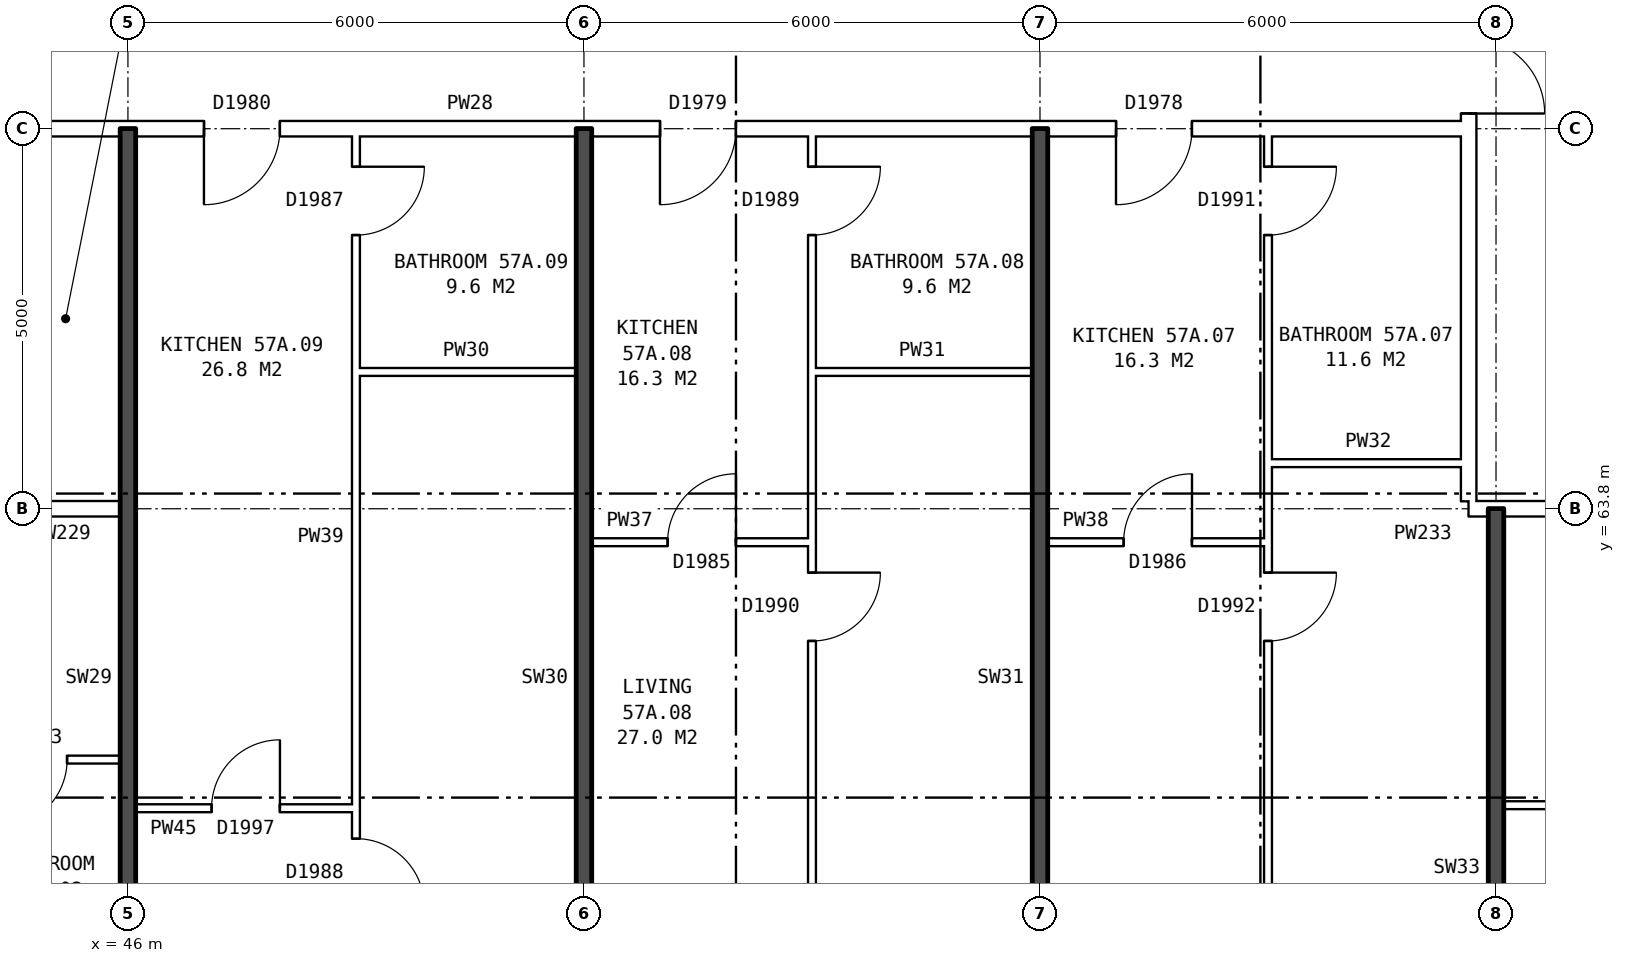
"""IFC4 building model, lengths in metres.
Left out: names, types, materials, properties, quantities, classifications, styles, units other than length and angle.
Written with IfcOpenShell. Run it as: python <this file> out.ifc"""

import sys

from ifc_helpers import new_model, si_unit, direction, frame, frame_2d, origin, place, context, subcontext, project, spatial, rectangle, extrude, element, fill, save


model = new_model("IFC4")
c1 = context("Model", 3, precision=1e-05, world=origin(), true_north=direction((0.0, 1.0)))
c2 = subcontext(c1, "Body", "Model", "MODEL_VIEW")
j1 = project(units=[si_unit("LENGTHUNIT", "METRE"), si_unit("PLANEANGLEUNIT", "RADIAN")], contexts=[c1])
p1 = place(None, origin())
s1 = spatial("IfcSite", under=j1, at=p1, CompositionType="ELEMENT")
p2 = place(p1, origin())
s2 = spatial("IfcBuilding", under=s1, at=p2, CompositionType="ELEMENT")
p3 = place(p2, frame((0.0, 0.0, 202.8)))
s3 = spatial("IfcBuildingStorey", under=s2, at=p3, CompositionType="ELEMENT", Elevation=202.8)
p4 = place(p3, frame((63.64, 63.9, 0.0), z_axis=(0.0, 0.0, 1.0), x_axis=(0.0, 1.0, 0.0)))
e1 = element("IfcWall", 1, at=p4, inside=s3, PredefinedType="PARTITIONING", context=c2, shape_type="SweptSolid", body=[
    extrude(rectangle(XDim=12.2, YDim=0.2, at=frame_2d((6.1, 0.0))), origin(), (0.0, 0.0, 1.0), 2.85),
])
p5 = place(p4, frame((5.1, 0.0, 0.0)))
e2 = element("IfcOpeningElement", 2, at=p5, cuts=e1, PredefinedType="OPENING", context=c2, shape_type="SweptSolid", body=[
    extrude(rectangle(XDim=2.0, YDim=2.1, at=frame_2d((1.0, 1.05))), frame((0.0, 0.11, 0.0), z_axis=(0.0, -1.0, 0.0), x_axis=(1.0, 0.0, 0.0)), (0.0, 0.0, 1.0), 0.22),
])
p6 = place(p3, frame((46.1, 59.86, 0.0), z_axis=(0.0, 0.0, 1.0), x_axis=(1.0, 0.0, 0.0)))
e3 = element("IfcWall", 3, at=p6, inside=s3, PredefinedType="PARTITIONING", context=c2, shape_type="SweptSolid", body=[
    extrude(rectangle(XDim=2.9, YDim=0.1, at=frame_2d((1.45, 0.0))), origin(), (0.0, 0.0, 1.0), 2.85),
])
p7 = place(p6, frame((1.0, 0.0, 0.0)))
e4 = element("IfcOpeningElement", 4, at=p7, cuts=e3, PredefinedType="OPENING", context=c2, shape_type="SweptSolid", body=[
    extrude(rectangle(XDim=0.9, YDim=2.1, at=frame_2d((0.45, 1.05))), frame((0.0, 0.06, 0.0), z_axis=(0.0, -1.0, 0.0), x_axis=(1.0, 0.0, 0.0)), (0.0, 0.0, 1.0), 0.12),
])
p8 = place(p3, frame((64.1, 59.9, 0.0), z_axis=(0.0, 0.0, 1.0), x_axis=(1.0, 0.0, 0.0)))
e5 = element("IfcWall", 5, at=p8, inside=s3, PredefinedType="PARTITIONING", context=c2, shape_type="SweptSolid", body=[
    extrude(rectangle(XDim=5.8, YDim=0.1, at=frame_2d((2.9, 0.0))), origin(), (0.0, 0.0, 1.0), 2.85),
])
p9 = place(p8, frame((3.6, 0.0, 0.0)))
e6 = element("IfcOpeningElement", 6, at=p9, cuts=e5, PredefinedType="OPENING", context=c2, shape_type="SweptSolid", body=[
    extrude(rectangle(XDim=0.9, YDim=2.1, at=frame_2d((0.45, 1.05))), frame((0.0, 0.06, 0.0), z_axis=(0.0, -1.0, 0.0), x_axis=(1.0, 0.0, 0.0)), (0.0, 0.0, 1.0), 0.12),
])
p10 = place(p8, frame((0.7, 0.0, 0.0)))
e7 = element("IfcOpeningElement", 7, at=p10, cuts=e5, PredefinedType="OPENING", context=c2, shape_type="SweptSolid", body=[
    extrude(rectangle(XDim=0.9, YDim=2.1, at=frame_2d((0.45, 1.05))), frame((0.0, 0.06, 0.0), z_axis=(0.0, -1.0, 0.0), x_axis=(1.0, 0.0, 0.0)), (0.0, 0.0, 1.0), 0.12),
])
p11 = place(p3, frame((40.1, 60.5, 0.0), z_axis=(0.0, 0.0, 1.0), x_axis=(1.0, 0.0, 0.0)))
e8 = element("IfcWall", 8, at=p11, inside=s3, PredefinedType="PARTITIONING", context=c2, shape_type="SweptSolid", body=[
    extrude(rectangle(XDim=5.8, YDim=0.1, at=frame_2d((2.9, 0.0))), origin(), (0.0, 0.0, 1.0), 2.85),
])
p12 = place(p11, frame((1.3, 0.0, 0.0)))
e9 = element("IfcOpeningElement", 9, at=p12, cuts=e8, PredefinedType="OPENING", context=c2, shape_type="SweptSolid", body=[
    extrude(rectangle(XDim=0.9, YDim=2.1, at=frame_2d((0.45, 1.05))), frame((0.0, 0.06, 0.0), z_axis=(0.0, -1.0, 0.0), x_axis=(1.0, 0.0, 0.0)), (0.0, 0.0, 1.0), 0.12),
])
p13 = place(p11, frame((4.2, 0.0, 0.0)))
e10 = element("IfcOpeningElement", 10, at=p13, cuts=e8, PredefinedType="OPENING", context=c2, shape_type="SweptSolid", body=[
    extrude(rectangle(XDim=0.9, YDim=2.1, at=frame_2d((0.45, 1.05))), frame((0.0, 0.06, 0.0), z_axis=(0.0, -1.0, 0.0), x_axis=(1.0, 0.0, 0.0)), (0.0, 0.0, 1.0), 0.12),
])
p14 = place(p3, frame((52.1, 63.36, 0.0), z_axis=(0.0, 0.0, 1.0), x_axis=(1.0, 0.0, 0.0)))
e11 = element("IfcWall", 11, at=p14, inside=s3, PredefinedType="PARTITIONING", context=c2, shape_type="SweptSolid", body=[
    extrude(rectangle(XDim=2.9, YDim=0.1, at=frame_2d((1.45, 0.0))), origin(), (0.0, 0.0, 1.0), 2.85),
])
p15 = place(p14, frame((1.0, 0.0, 0.0)))
e12 = element("IfcOpeningElement", 12, at=p15, cuts=e11, PredefinedType="OPENING", context=c2, shape_type="SweptSolid", body=[
    extrude(rectangle(XDim=0.9, YDim=2.1, at=frame_2d((0.45, 1.05))), frame((0.0, 0.06, 0.0), z_axis=(0.0, -1.0, 0.0), x_axis=(1.0, 0.0, 0.0)), (0.0, 0.0, 1.0), 0.12),
])
p16 = place(p3, frame((58.1, 63.36, 0.0), z_axis=(0.0, 0.0, 1.0), x_axis=(1.0, 0.0, 0.0)))
e13 = element("IfcWall", 13, at=p16, inside=s3, PredefinedType="PARTITIONING", context=c2, shape_type="SweptSolid", body=[
    extrude(rectangle(XDim=2.9, YDim=0.1, at=frame_2d((1.45, 0.0))), origin(), (0.0, 0.0, 1.0), 2.85),
])
p17 = place(p16, frame((1.0, 0.0, 0.0)))
e14 = element("IfcOpeningElement", 14, at=p17, cuts=e13, PredefinedType="OPENING", context=c2, shape_type="SweptSolid", body=[
    extrude(rectangle(XDim=0.9, YDim=2.1, at=frame_2d((0.45, 1.05))), frame((0.0, 0.06, 0.0), z_axis=(0.0, -1.0, 0.0), x_axis=(1.0, 0.0, 0.0)), (0.0, 0.0, 1.0), 0.12),
])
p18 = place(p3, frame((44.36, 63.8, 0.0), z_axis=(0.0, 0.0, 1.0), x_axis=(1.0, 0.0, 0.0)))
e15 = element("IfcWall", 15, at=p18, inside=s3, PredefinedType="PARTITIONING", context=c2, shape_type="SweptSolid", body=[
    extrude(rectangle(XDim=1.54, YDim=0.2, at=frame_2d((0.77, 0.0))), origin(), (0.0, 0.0, 1.0), 2.85),
])
p19 = place(p3, frame((63.64, 63.8, 0.0), z_axis=(0.0, 0.0, 1.0), x_axis=(1.0, 0.0, 0.0)))
e16 = element("IfcWall", 16, at=p19, inside=s3, PredefinedType="PARTITIONING", context=c2, shape_type="SweptSolid", body=[
    extrude(rectangle(XDim=3.0, YDim=0.2, at=frame_2d((1.5, 0.0))), origin(), (0.0, 0.0, 1.0), 2.85),
])
p20 = place(p19, frame((1.18, 0.0, 0.0)))
e17 = element("IfcOpeningElement", 17, at=p20, cuts=e16, PredefinedType="OPENING", context=c2, shape_type="SweptSolid", body=[
    extrude(rectangle(XDim=1.0, YDim=2.1, at=frame_2d((0.5, 1.05))), frame((0.0, 0.11, 0.0), z_axis=(0.0, -1.0, 0.0), x_axis=(1.0, 0.0, 0.0)), (0.0, 0.0, 1.0), 0.22),
])
p21 = place(p3, frame((61.0, 64.4, 0.0), z_axis=(0.0, 0.0, 1.0), x_axis=(1.0, 0.0, 0.0)))
e18 = element("IfcWall", 18, at=p21, inside=s3, PredefinedType="PARTITIONING", context=c2, shape_type="SweptSolid", body=[
    extrude(rectangle(XDim=2.64, YDim=0.1, at=frame_2d((1.32, 0.0))), origin(), (0.0, 0.0, 1.0), 2.85),
])
for number, where, z_axis, x_axis in (
    (19, (49.0, 65.6, 0.0), (0.0, 0.0, 1.0), (1.0, 0.0, 0.0)),
    (20, (55.0, 65.6, 0.0), (0.0, 0.0, 1.0), (1.0, 0.0, 0.0)),
):
    element("IfcWall", number, at=place(p3, frame(where, z_axis=z_axis, x_axis=x_axis)), inside=s3, PredefinedType="PARTITIONING", context=c2, shape_type="SweptSolid", body=[
        extrude(rectangle(XDim=2.9, YDim=0.1, at=frame_2d((1.45, 0.0))), origin(), (0.0, 0.0, 1.0), 2.85),
    ])
p22 = place(p3, frame((44.36, 68.8, 0.0), z_axis=(0.0, 0.0, 1.0), x_axis=(1.0, 0.0, 0.0)))
e21 = element("IfcWall", 21, at=p22, inside=s3, PredefinedType="PARTITIONING", context=c2, shape_type="SweptSolid", body=[
    extrude(rectangle(XDim=19.28, YDim=0.2, at=frame_2d((9.64, 0.0))), origin(), (0.0, 0.0, 1.0), 2.85),
])
p23 = place(p22, frame((14.64, 0.0, 0.0)))
e22 = element("IfcOpeningElement", 22, at=p23, cuts=e21, PredefinedType="OPENING", context=c2, shape_type="SweptSolid", body=[
    extrude(rectangle(XDim=1.0, YDim=2.1, at=frame_2d((0.5, 1.05))), frame((0.0, 0.11, 0.0), z_axis=(0.0, -1.0, 0.0), x_axis=(1.0, 0.0, 0.0)), (0.0, 0.0, 1.0), 0.22),
])
p24 = place(p22, frame((8.64, 0.0, 0.0)))
e23 = element("IfcOpeningElement", 23, at=p24, cuts=e21, PredefinedType="OPENING", context=c2, shape_type="SweptSolid", body=[
    extrude(rectangle(XDim=1.0, YDim=2.1, at=frame_2d((0.5, 1.05))), frame((0.0, 0.11, 0.0), z_axis=(0.0, -1.0, 0.0), x_axis=(1.0, 0.0, 0.0)), (0.0, 0.0, 1.0), 0.22),
])
p25 = place(p22, frame((2.64, 0.0, 0.0)))
e24 = element("IfcOpeningElement", 24, at=p25, cuts=e21, PredefinedType="OPENING", context=c2, shape_type="SweptSolid", body=[
    extrude(rectangle(XDim=1.0, YDim=2.1, at=frame_2d((0.5, 1.05))), frame((0.0, 0.11, 0.0), z_axis=(0.0, -1.0, 0.0), x_axis=(1.0, 0.0, 0.0)), (0.0, 0.0, 1.0), 0.22),
])
p26 = place(p3, frame((46.0, 54.36, 0.0), z_axis=(0.0, 0.0, 1.0), x_axis=(0.0, 1.0, 0.0)))
e25 = element("IfcWall", 25, at=p26, inside=s3, PredefinedType="SOLIDWALL", context=c2, shape_type="SweptSolid", body=[
    extrude(rectangle(XDim=14.44, YDim=0.2, at=frame_2d((7.22, 0.0))), origin(), (0.0, 0.0, 1.0), 2.85),
])
p27 = place(p3, frame((49.0, 54.36, 0.0), z_axis=(0.0, 0.0, 1.0), x_axis=(0.0, 1.0, 0.0)))
e26 = element("IfcWall", 26, at=p27, inside=s3, PredefinedType="PARTITIONING", context=c2, shape_type="SweptSolid", body=[
    extrude(rectangle(XDim=14.34, YDim=0.1, at=frame_2d((7.17, 0.0))), origin(), (0.0, 0.0, 1.0), 2.85),
])
p28 = place(p27, frame((4.2, 0.0, 0.0)))
e27 = element("IfcOpeningElement", 27, at=p28, cuts=e26, PredefinedType="OPENING", context=c2, shape_type="SweptSolid", body=[
    extrude(rectangle(XDim=0.9, YDim=2.1, at=frame_2d((0.45, 1.05))), frame((0.0, 0.06, 0.0), z_axis=(0.0, -1.0, 0.0), x_axis=(1.0, 0.0, 0.0)), (0.0, 0.0, 1.0), 0.12),
])
p29 = place(p27, frame((13.04, 0.0, 0.0)))
e28 = element("IfcOpeningElement", 28, at=p29, cuts=e26, PredefinedType="OPENING", context=c2, shape_type="SweptSolid", body=[
    extrude(rectangle(XDim=0.9, YDim=2.1, at=frame_2d((0.45, 1.05))), frame((0.0, 0.06, 0.0), z_axis=(0.0, -1.0, 0.0), x_axis=(1.0, 0.0, 0.0)), (0.0, 0.0, 1.0), 0.12),
])
p30 = place(p3, frame((52.0, 54.36, 0.0), z_axis=(0.0, 0.0, 1.0), x_axis=(0.0, 1.0, 0.0)))
e29 = element("IfcWall", 29, at=p30, inside=s3, PredefinedType="SOLIDWALL", context=c2, shape_type="SweptSolid", body=[
    extrude(rectangle(XDim=14.44, YDim=0.2, at=frame_2d((7.22, 0.0))), origin(), (0.0, 0.0, 1.0), 2.85),
])
p31 = place(p3, frame((55.0, 54.36, 0.0), z_axis=(0.0, 0.0, 1.0), x_axis=(0.0, 1.0, 0.0)))
e30 = element("IfcWall", 30, at=p31, inside=s3, PredefinedType="PARTITIONING", context=c2, shape_type="SweptSolid", body=[
    extrude(rectangle(XDim=14.34, YDim=0.1, at=frame_2d((7.17, 0.0))), origin(), (0.0, 0.0, 1.0), 2.85),
])
p32 = place(p31, frame((7.7, 0.0, 0.0)))
e31 = element("IfcOpeningElement", 31, at=p32, cuts=e30, PredefinedType="OPENING", context=c2, shape_type="SweptSolid", body=[
    extrude(rectangle(XDim=0.9, YDim=2.1, at=frame_2d((0.45, 1.05))), frame((0.0, 0.06, 0.0), z_axis=(0.0, -1.0, 0.0), x_axis=(1.0, 0.0, 0.0)), (0.0, 0.0, 1.0), 0.12),
])
p33 = place(p31, frame((13.04, 0.0, 0.0)))
e32 = element("IfcOpeningElement", 32, at=p33, cuts=e30, PredefinedType="OPENING", context=c2, shape_type="SweptSolid", body=[
    extrude(rectangle(XDim=0.9, YDim=2.1, at=frame_2d((0.45, 1.05))), frame((0.0, 0.06, 0.0), z_axis=(0.0, -1.0, 0.0), x_axis=(1.0, 0.0, 0.0)), (0.0, 0.0, 1.0), 0.12),
])
p34 = place(p3, frame((58.0, 54.36, 0.0), z_axis=(0.0, 0.0, 1.0), x_axis=(0.0, 1.0, 0.0)))
e33 = element("IfcWall", 33, at=p34, inside=s3, PredefinedType="SOLIDWALL", context=c2, shape_type="SweptSolid", body=[
    extrude(rectangle(XDim=14.44, YDim=0.2, at=frame_2d((7.22, 0.0))), origin(), (0.0, 0.0, 1.0), 2.85),
])
p35 = place(p3, frame((61.0, 54.36, 0.0), z_axis=(0.0, 0.0, 1.0), x_axis=(0.0, 1.0, 0.0)))
e34 = element("IfcWall", 34, at=p35, inside=s3, PredefinedType="PARTITIONING", context=c2, shape_type="SweptSolid", body=[
    extrude(rectangle(XDim=14.34, YDim=0.1, at=frame_2d((7.17, 0.0))), origin(), (0.0, 0.0, 1.0), 2.85),
])
p36 = place(p35, frame((7.7, 0.0, 0.0)))
e35 = element("IfcOpeningElement", 35, at=p36, cuts=e34, PredefinedType="OPENING", context=c2, shape_type="SweptSolid", body=[
    extrude(rectangle(XDim=0.9, YDim=2.1, at=frame_2d((0.45, 1.05))), frame((0.0, 0.06, 0.0), z_axis=(0.0, -1.0, 0.0), x_axis=(1.0, 0.0, 0.0)), (0.0, 0.0, 1.0), 0.12),
])
p37 = place(p35, frame((13.04, 0.0, 0.0)))
e36 = element("IfcOpeningElement", 36, at=p37, cuts=e34, PredefinedType="OPENING", context=c2, shape_type="SweptSolid", body=[
    extrude(rectangle(XDim=0.9, YDim=2.1, at=frame_2d((0.45, 1.05))), frame((0.0, 0.06, 0.0), z_axis=(0.0, -1.0, 0.0), x_axis=(1.0, 0.0, 0.0)), (0.0, 0.0, 1.0), 0.12),
])
p38 = place(p3, frame((64.0, 54.36, 0.0), z_axis=(0.0, 0.0, 1.0), x_axis=(0.0, 1.0, 0.0)))
e37 = element("IfcWall", 37, at=p38, inside=s3, PredefinedType="SOLIDWALL", context=c2, shape_type="SweptSolid", body=[
    extrude(rectangle(XDim=9.44, YDim=0.2, at=frame_2d((4.72, 0.0))), origin(), (0.0, 0.0, 1.0), 2.85),
])
p39 = place(p5, frame((2.0, 0.0, 0.0), z_axis=(0.0, 0.0, 1.0), x_axis=(-1.0, 0.0, 0.0)))
e38 = element("IfcDoor", 38, at=p39, inside=s3, OperationType="DOUBLE_DOOR_SINGLE_SWING", PredefinedType="DOOR", context=c2, shape_type="SweptSolid", body=[
    extrude(rectangle(XDim=2.0, YDim=2.1, at=frame_2d((1.0, 1.05))), frame((0.0, 0.025, 0.0), z_axis=(0.0, -1.0, 0.0), x_axis=(1.0, 0.0, 0.0)), (0.0, 0.0, 1.0), 0.05),
])
fill(e2, e38)
p40 = place(p13, frame((0.9, 0.0, 0.0), z_axis=(0.0, 0.0, 1.0), x_axis=(-1.0, 0.0, 0.0)))
e39 = element("IfcDoor", 39, at=p40, inside=s3, OperationType="SINGLE_SWING_RIGHT", PredefinedType="DOOR", context=c2, shape_type="SweptSolid", body=[
    extrude(rectangle(XDim=0.9, YDim=2.1, at=frame_2d((0.45, 1.05))), frame((0.0, 0.025, 0.0), z_axis=(0.0, -1.0, 0.0), x_axis=(1.0, 0.0, 0.0)), (0.0, 0.0, 1.0), 0.05),
])
fill(e10, e39)
p41 = place(p36, frame((0.9, 0.0, 0.0), z_axis=(0.0, 0.0, 1.0), x_axis=(-1.0, 0.0, 0.0)))
e40 = element("IfcDoor", 40, at=p41, inside=s3, OperationType="SINGLE_SWING_LEFT", PredefinedType="DOOR", context=c2, shape_type="SweptSolid", body=[
    extrude(rectangle(XDim=0.9, YDim=2.1, at=frame_2d((0.45, 1.05))), frame((0.0, 0.025, 0.0), z_axis=(0.0, -1.0, 0.0), x_axis=(1.0, 0.0, 0.0)), (0.0, 0.0, 1.0), 0.05),
])
fill(e35, e40)
p42 = place(p23, frame((1.0, 0.0, 0.0), z_axis=(0.0, 0.0, 1.0), x_axis=(-1.0, 0.0, 0.0)))
e41 = element("IfcDoor", 41, at=p42, inside=s3, OperationType="SINGLE_SWING_RIGHT", PredefinedType="DOOR", context=c2, shape_type="SweptSolid", body=[
    extrude(rectangle(XDim=1.0, YDim=2.1, at=frame_2d((0.5, 1.05))), frame((0.0, 0.025, 0.0), z_axis=(0.0, -1.0, 0.0), x_axis=(1.0, 0.0, 0.0)), (0.0, 0.0, 1.0), 0.05),
])
fill(e22, e41)
p43 = place(p17, origin())
e42 = element("IfcDoor", 42, at=p43, inside=s3, OperationType="SINGLE_SWING_RIGHT", PredefinedType="DOOR", context=c2, shape_type="SweptSolid", body=[
    extrude(rectangle(XDim=0.9, YDim=2.1, at=frame_2d((0.45, 1.05))), frame((0.0, 0.025, 0.0), z_axis=(0.0, -1.0, 0.0), x_axis=(1.0, 0.0, 0.0)), (0.0, 0.0, 1.0), 0.05),
])
fill(e14, e42)
p44 = place(p37, frame((0.9, 0.0, 0.0), z_axis=(0.0, 0.0, 1.0), x_axis=(-1.0, 0.0, 0.0)))
e43 = element("IfcDoor", 43, at=p44, inside=s3, OperationType="SINGLE_SWING_LEFT", PredefinedType="DOOR", context=c2, shape_type="SweptSolid", body=[
    extrude(rectangle(XDim=0.9, YDim=2.1, at=frame_2d((0.45, 1.05))), frame((0.0, 0.025, 0.0), z_axis=(0.0, -1.0, 0.0), x_axis=(1.0, 0.0, 0.0)), (0.0, 0.0, 1.0), 0.05),
])
fill(e36, e43)
p45 = place(p32, frame((0.9, 0.0, 0.0), z_axis=(0.0, 0.0, 1.0), x_axis=(-1.0, 0.0, 0.0)))
e44 = element("IfcDoor", 44, at=p45, inside=s3, OperationType="SINGLE_SWING_LEFT", PredefinedType="DOOR", context=c2, shape_type="SweptSolid", body=[
    extrude(rectangle(XDim=0.9, YDim=2.1, at=frame_2d((0.45, 1.05))), frame((0.0, 0.025, 0.0), z_axis=(0.0, -1.0, 0.0), x_axis=(1.0, 0.0, 0.0)), (0.0, 0.0, 1.0), 0.05),
])
fill(e31, e44)
p46 = place(p24, frame((1.0, 0.0, 0.0), z_axis=(0.0, 0.0, 1.0), x_axis=(-1.0, 0.0, 0.0)))
e45 = element("IfcDoor", 45, at=p46, inside=s3, OperationType="SINGLE_SWING_RIGHT", PredefinedType="DOOR", context=c2, shape_type="SweptSolid", body=[
    extrude(rectangle(XDim=1.0, YDim=2.1, at=frame_2d((0.5, 1.05))), frame((0.0, 0.025, 0.0), z_axis=(0.0, -1.0, 0.0), x_axis=(1.0, 0.0, 0.0)), (0.0, 0.0, 1.0), 0.05),
])
fill(e23, e45)
p47 = place(p15, origin())
e46 = element("IfcDoor", 46, at=p47, inside=s3, OperationType="SINGLE_SWING_RIGHT", PredefinedType="DOOR", context=c2, shape_type="SweptSolid", body=[
    extrude(rectangle(XDim=0.9, YDim=2.1, at=frame_2d((0.45, 1.05))), frame((0.0, 0.025, 0.0), z_axis=(0.0, -1.0, 0.0), x_axis=(1.0, 0.0, 0.0)), (0.0, 0.0, 1.0), 0.05),
])
fill(e12, e46)
p48 = place(p33, frame((0.9, 0.0, 0.0), z_axis=(0.0, 0.0, 1.0), x_axis=(-1.0, 0.0, 0.0)))
e47 = element("IfcDoor", 47, at=p48, inside=s3, OperationType="SINGLE_SWING_LEFT", PredefinedType="DOOR", context=c2, shape_type="SweptSolid", body=[
    extrude(rectangle(XDim=0.9, YDim=2.1, at=frame_2d((0.45, 1.05))), frame((0.0, 0.025, 0.0), z_axis=(0.0, -1.0, 0.0), x_axis=(1.0, 0.0, 0.0)), (0.0, 0.0, 1.0), 0.05),
])
fill(e32, e47)
p49 = place(p28, frame((0.9, 0.0, 0.0), z_axis=(0.0, 0.0, 1.0), x_axis=(-1.0, 0.0, 0.0)))
e48 = element("IfcDoor", 48, at=p49, inside=s3, OperationType="SINGLE_SWING_RIGHT", PredefinedType="DOOR", context=c2, shape_type="SweptSolid", body=[
    extrude(rectangle(XDim=0.9, YDim=2.1, at=frame_2d((0.45, 1.05))), frame((0.0, 0.025, 0.0), z_axis=(0.0, -1.0, 0.0), x_axis=(1.0, 0.0, 0.0)), (0.0, 0.0, 1.0), 0.05),
])
fill(e27, e48)
p50 = place(p25, frame((1.0, 0.0, 0.0), z_axis=(0.0, 0.0, 1.0), x_axis=(-1.0, 0.0, 0.0)))
e49 = element("IfcDoor", 49, at=p50, inside=s3, OperationType="SINGLE_SWING_RIGHT", PredefinedType="DOOR", context=c2, shape_type="SweptSolid", body=[
    extrude(rectangle(XDim=1.0, YDim=2.1, at=frame_2d((0.5, 1.05))), frame((0.0, 0.025, 0.0), z_axis=(0.0, -1.0, 0.0), x_axis=(1.0, 0.0, 0.0)), (0.0, 0.0, 1.0), 0.05),
])
fill(e24, e49)
p51 = place(p7, origin())
e50 = element("IfcDoor", 50, at=p51, inside=s3, OperationType="SINGLE_SWING_RIGHT", PredefinedType="DOOR", context=c2, shape_type="SweptSolid", body=[
    extrude(rectangle(XDim=0.9, YDim=2.1, at=frame_2d((0.45, 1.05))), frame((0.0, 0.025, 0.0), z_axis=(0.0, -1.0, 0.0), x_axis=(1.0, 0.0, 0.0)), (0.0, 0.0, 1.0), 0.05),
])
fill(e4, e50)
p52 = place(p29, frame((0.9, 0.0, 0.0), z_axis=(0.0, 0.0, 1.0), x_axis=(-1.0, 0.0, 0.0)))
e51 = element("IfcDoor", 51, at=p52, inside=s3, OperationType="SINGLE_SWING_LEFT", PredefinedType="DOOR", context=c2, shape_type="SweptSolid", body=[
    extrude(rectangle(XDim=0.9, YDim=2.1, at=frame_2d((0.45, 1.05))), frame((0.0, 0.025, 0.0), z_axis=(0.0, -1.0, 0.0), x_axis=(1.0, 0.0, 0.0)), (0.0, 0.0, 1.0), 0.05),
])
fill(e28, e51)
save(model, sys.argv[1])
